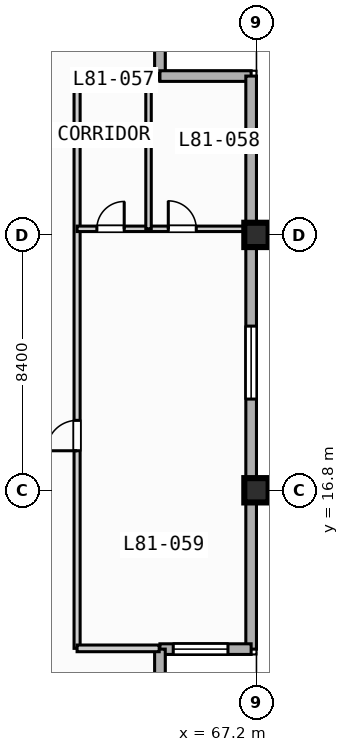
"""IFC4 building model, lengths in metres.
Left out: names, types, materials, properties, quantities, classifications, styles, units other than length and angle.
Written with IfcOpenShell. Run it as: python <this file> out.ifc"""

import sys

from ifc_helpers import new_model, si_unit, direction, frame, frame_2d, origin, origin_2d, place, context, subcontext, project, spatial, rectangle, extrude, element, fill, save


model = new_model("IFC4")
c1 = context("Model", 3, precision=1e-05, world=origin(), true_north=direction((0.0, 1.0)))
c2 = subcontext(c1, "Body", "Model", "MODEL_VIEW")
j1 = project(units=[si_unit("LENGTHUNIT", "METRE"), si_unit("PLANEANGLEUNIT", "RADIAN")], contexts=[c1])
p1 = place(None, origin())
s1 = spatial("IfcSite", under=j1, at=p1, CompositionType="ELEMENT")
p2 = place(p1, origin())
s2 = spatial("IfcBuilding", under=s1, at=p2, CompositionType="ELEMENT")
p3 = place(p2, frame((0.0, 0.0, 328.1)))
s3 = spatial("IfcBuildingStorey", under=s2, at=p3, CompositionType="ELEMENT", Elevation=328.1)
for number, where, z_axis, x_axis in (
    (1, (67.2, 16.8, 0.0), (0.0, 0.0, 1.0), (1.0, 0.0, 0.0)),
    (2, (67.2, 25.2, 0.0), (0.0, 0.0, 1.0), (1.0, 0.0, 0.0)),
):
    element("IfcColumn", number, at=place(p3, frame(where, z_axis=z_axis, x_axis=x_axis)), inside=s3, PredefinedType="COLUMN", context=c2, shape_type="SweptSolid", body=[
        extrude(rectangle(XDim=0.8, YDim=0.8, at=origin_2d()), origin(), (0.0, 0.0, 1.0), 3.9),
    ])
for number, where, z_axis, x_axis in (
    (3, (64.025, 33.425, 0.0), (0.0, 0.0, 1.0), (0.0, -1.0, 0.0)),
    (4, (64.025, 30.425, 0.0), (0.0, 0.0, 1.0), (1.0, 0.0, 0.0)),
):
    element("IfcWall", number, at=place(p3, frame(where, z_axis=z_axis, x_axis=x_axis)), inside=s3, PredefinedType="STANDARD", context=c2, shape_type="SweptSolid", body=[
        extrude(rectangle(XDim=3.0, YDim=0.35, at=frame_2d((1.5, 0.0))), origin(), (0.0, 0.0, 1.0), 3.67),
    ])
p4 = place(p3, frame((67.025, 30.425, 0.0), z_axis=(0.0, 0.0, 1.0), x_axis=(0.0, -1.0, 0.0)))
e5 = element("IfcWall", 5, at=p4, inside=s3, PredefinedType="STANDARD", context=c2, shape_type="SweptSolid", body=[
    extrude(rectangle(XDim=18.85, YDim=0.35, at=frame_2d((9.425, 0.0))), origin(), (0.0, 0.0, 1.0), 3.67),
])
p5 = place(p4, frame((8.225, 0.0, 0.85)))
e6 = element("IfcOpeningElement", 6, at=p5, cuts=e5, PredefinedType="OPENING", context=c2, shape_type="SweptSolid", body=[
    extrude(rectangle(XDim=2.4, YDim=1.95, at=frame_2d((1.2, 0.975))), frame((0.0, 0.185, 0.0), z_axis=(0.0, -1.0, 0.0), x_axis=(1.0, 0.0, 0.0)), (0.0, 0.0, 1.0), 0.37),
])
p6 = place(p3, frame((67.025, 11.575, 0.0), z_axis=(0.0, 0.0, 1.0), x_axis=(-1.0, 0.0, 0.0)))
e7 = element("IfcWall", 7, at=p6, inside=s3, PredefinedType="STANDARD", context=c2, shape_type="SweptSolid", body=[
    extrude(rectangle(XDim=3.0, YDim=0.35, at=frame_2d((1.5, 0.0))), origin(), (0.0, 0.0, 1.0), 3.67),
])
p7 = place(p6, frame((0.762, 0.0, 0.85)))
e8 = element("IfcOpeningElement", 8, at=p7, cuts=e7, PredefinedType="OPENING", context=c2, shape_type="SweptSolid", body=[
    extrude(rectangle(XDim=1.8, YDim=1.8, at=frame_2d((0.9, 0.9))), frame((0.0, 0.185, 0.0), z_axis=(0.0, -1.0, 0.0), x_axis=(1.0, 0.0, 0.0)), (0.0, 0.0, 1.0), 0.37),
])
p8 = place(p3, frame((64.025, 11.575, 0.0), z_axis=(0.0, 0.0, 1.0), x_axis=(0.0, -1.0, 0.0)))
e9 = element("IfcWall", 9, at=p8, inside=s3, PredefinedType="STANDARD", context=c2, shape_type="SweptSolid", body=[
    extrude(rectangle(XDim=3.0, YDim=0.35, at=frame_2d((1.5, 0.0))), origin(), (0.0, 0.0, 1.0), 3.67),
])
p9 = place(p3, frame((61.3, 11.6, 0.0), z_axis=(0.0, 0.0, 1.0), x_axis=(0.0, 1.0, 0.0)))
e10 = element("IfcWall", 10, at=p9, inside=s3, PredefinedType="PARTITIONING", context=c2, shape_type="SweptSolid", body=[
    extrude(rectangle(XDim=18.8, YDim=0.2, at=frame_2d((9.4, 0.0))), origin(), (0.0, 0.0, 1.0), 3.67),
])
p10 = place(p9, frame((6.5, 0.0, 0.0)))
e11 = element("IfcOpeningElement", 11, at=p10, cuts=e10, PredefinedType="OPENING", context=c2, shape_type="SweptSolid", body=[
    extrude(rectangle(XDim=1.0, YDim=2.15, at=frame_2d((0.5, 1.075))), frame((0.0, 0.11, 0.0), z_axis=(0.0, -1.0, 0.0), x_axis=(1.0, 0.0, 0.0)), (0.0, 0.0, 1.0), 0.22),
])
p11 = place(p3, frame((61.3, 25.4, 0.0), z_axis=(0.0, 0.0, 1.0), x_axis=(1.0, 0.0, 0.0)))
e12 = element("IfcWall", 12, at=p11, inside=s3, PredefinedType="PLUMBINGWALL", context=c2, shape_type="SweptSolid", body=[
    extrude(rectangle(XDim=5.5, YDim=0.18, at=frame_2d((2.75, 0.0))), origin(), (0.0, 0.0, 1.0), 3.316),
])
p12 = place(p11, frame((0.65, 0.0, 0.0)))
e13 = element("IfcOpeningElement", 13, at=p12, cuts=e12, PredefinedType="OPENING", context=c2, shape_type="SweptSolid", body=[
    extrude(rectangle(XDim=0.9, YDim=2.1, at=frame_2d((0.45, 1.05))), frame((0.0, 0.1, 0.0), z_axis=(0.0, -1.0, 0.0), x_axis=(1.0, 0.0, 0.0)), (0.0, 0.0, 1.0), 0.2),
])
p13 = place(p11, frame((3.0, 0.0, 0.0)))
e14 = element("IfcOpeningElement", 14, at=p13, cuts=e12, PredefinedType="OPENING", context=c2, shape_type="SweptSolid", body=[
    extrude(rectangle(XDim=0.92, YDim=2.1, at=frame_2d((0.46, 1.05))), frame((0.0, 0.1, 0.0), z_axis=(0.0, -1.0, 0.0), x_axis=(1.0, 0.0, 0.0)), (0.0, 0.0, 1.0), 0.2),
])
p14 = place(p3, frame((63.65, 25.4, 0.0), z_axis=(0.0, 0.0, 1.0), x_axis=(0.0, 1.0, 0.0)))
e15 = element("IfcWall", 15, at=p14, inside=s3, PredefinedType="PLUMBINGWALL", context=c2, shape_type="SweptSolid", body=[
    extrude(rectangle(XDim=5.0, YDim=0.18, at=frame_2d((2.5, 0.0))), origin(), (0.0, 0.0, 1.0), 3.67),
])
for number, where, z_axis, x_axis in (
    (16, (61.3, 11.6, 0.0), (0.0, 0.0, 1.0), (1.0, 0.0, 0.0)),
    (17, (61.3, 30.4, 0.0), (0.0, 0.0, 1.0), (1.0, 0.0, 0.0)),
):
    element("IfcWall", number, at=place(p3, frame(where, z_axis=z_axis, x_axis=x_axis)), inside=s3, PredefinedType="PARTITIONING", context=c2, shape_type="SweptSolid", body=[
        extrude(rectangle(XDim=2.7, YDim=0.22, at=frame_2d((1.35, 0.0))), origin(), (0.0, 0.0, 1.0), 3.67),
    ])
p15 = place(p5, origin())
e18 = element("IfcWindow", 18, at=p15, inside=s3, PartitioningType="SINGLE_PANEL", PredefinedType="WINDOW", context=c2, shape_type="SweptSolid", body=[
    extrude(rectangle(XDim=2.4, YDim=1.95, at=frame_2d((1.2, 0.975))), frame((0.0, 0.03, 0.0), z_axis=(0.0, -1.0, 0.0), x_axis=(1.0, 0.0, 0.0)), (0.0, 0.0, 1.0), 0.06),
])
fill(e6, e18)
p16 = place(p7, origin())
e19 = element("IfcWindow", 19, at=p16, inside=s3, PartitioningType="SINGLE_PANEL", PredefinedType="WINDOW", context=c2, shape_type="SweptSolid", body=[
    extrude(rectangle(XDim=1.8, YDim=1.8, at=frame_2d((0.9, 0.9))), frame((0.0, 0.03, 0.0), z_axis=(0.0, -1.0, 0.0), x_axis=(1.0, 0.0, 0.0)), (0.0, 0.0, 1.0), 0.06),
])
fill(e8, e19)
p17 = place(p10, origin())
e20 = element("IfcDoor", 20, at=p17, inside=s3, OperationType="SINGLE_SWING_LEFT", PredefinedType="DOOR", context=c2, shape_type="SweptSolid", body=[
    extrude(rectangle(XDim=1.0, YDim=2.15, at=frame_2d((0.5, 1.075))), frame((0.0, 0.025, 0.0), z_axis=(0.0, -1.0, 0.0), x_axis=(1.0, 0.0, 0.0)), (0.0, 0.0, 1.0), 0.05),
])
fill(e11, e20)
p18 = place(p12, origin())
e21 = element("IfcDoor", 21, at=p18, inside=s3, OperationType="SINGLE_SWING_RIGHT", PredefinedType="DOOR", context=c2, shape_type="SweptSolid", body=[
    extrude(rectangle(XDim=0.9, YDim=2.1, at=frame_2d((0.45, 1.05))), frame((0.0, 0.025, 0.0), z_axis=(0.0, -1.0, 0.0), x_axis=(1.0, 0.0, 0.0)), (0.0, 0.0, 1.0), 0.05),
])
fill(e13, e21)
p19 = place(p13, origin())
e22 = element("IfcDoor", 22, at=p19, inside=s3, OperationType="SINGLE_SWING_LEFT", PredefinedType="DOOR", context=c2, shape_type="SweptSolid", body=[
    extrude(rectangle(XDim=0.92, YDim=2.1, at=frame_2d((0.46, 1.05))), frame((0.0, 0.025, 0.0), z_axis=(0.0, -1.0, 0.0), x_axis=(1.0, 0.0, 0.0)), (0.0, 0.0, 1.0), 0.05),
])
fill(e14, e22)
save(model, sys.argv[1])
